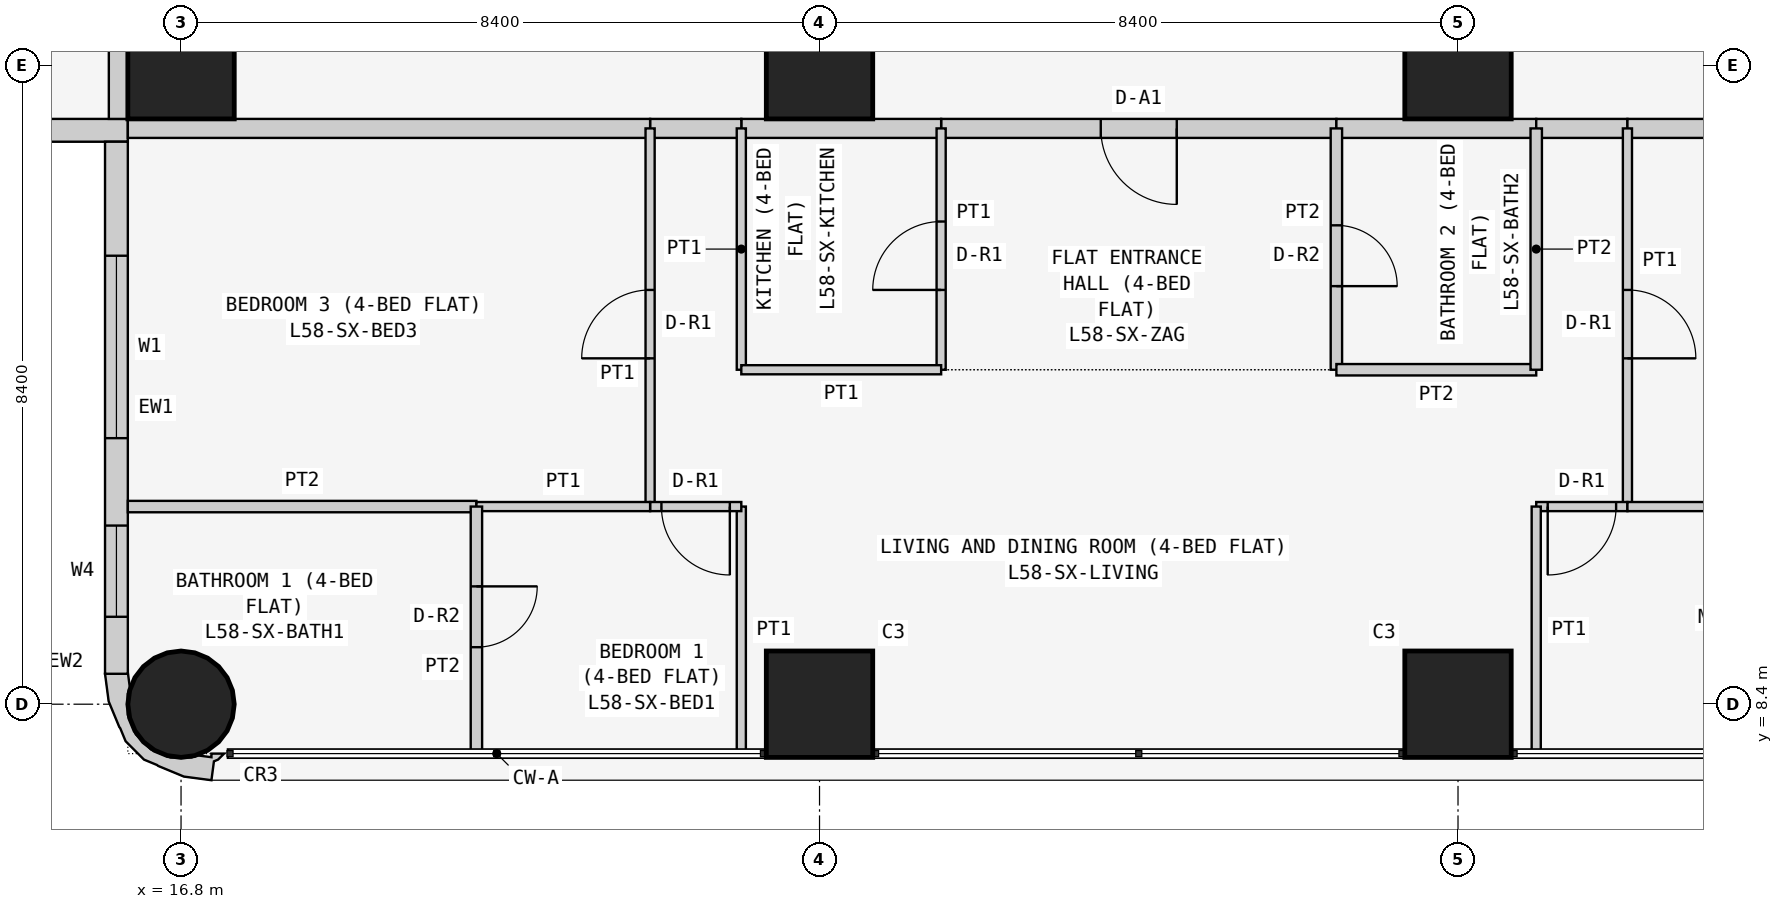
"""IFC4 building model, lengths in metres.
Left out: names, types, materials, properties, quantities, classifications, styles, units other than length and angle.
Written with IfcOpenShell. Run it as: python <this file> out.ifc"""

import sys

from ifc_helpers import new_model, si_unit, direction, frame, frame_2d, origin, origin_2d, place, context, subcontext, project, spatial, polyline, rectangle, circle, outline, extrude, element, fill, save


model = new_model("IFC4")
c1 = context("Model", 3, precision=1e-05, world=origin(), true_north=direction((0.0, 1.0)))
c2 = subcontext(c1, "Body", "Model", "MODEL_VIEW")
j1 = project(units=[si_unit("LENGTHUNIT", "METRE"), si_unit("PLANEANGLEUNIT", "RADIAN")], contexts=[c1])
p1 = place(None, origin())
s1 = spatial("IfcSite", under=j1, at=p1, CompositionType="ELEMENT")
p2 = place(p1, origin())
s2 = spatial("IfcBuilding", under=s1, at=p2, CompositionType="ELEMENT")
p3 = place(p2, frame((0.0, 0.0, 222.9)))
s3 = spatial("IfcBuildingStorey", under=s2, at=p3, CompositionType="ELEMENT", Elevation=222.9)
p4 = place(p3, frame((16.8, 8.4, 0.0), z_axis=(0.0, 0.0, 1.0), x_axis=(1.0, 0.0, 0.0)))
e1 = element("IfcColumn", 1, at=p4, inside=s3, PredefinedType="COLUMN", context=c2, shape_type="SweptSolid", body=[
    extrude(circle(Radius=0.7, at=origin_2d()), origin(), (0.0, 0.0, 1.0), 3.6),
])
for number, where, z_axis, x_axis in (
    (2, (16.8, 16.8, 0.0), (0.0, 0.0, 1.0), (1.0, 0.0, 0.0)),
    (3, (25.2, 8.4, 0.0), (0.0, 0.0, 1.0), (1.0, 0.0, 0.0)),
    (4, (25.2, 16.8, 0.0), (0.0, 0.0, 1.0), (1.0, 0.0, 0.0)),
    (5, (33.6, 8.4, 0.0), (0.0, 0.0, 1.0), (1.0, 0.0, 0.0)),
    (6, (33.6, 16.8, 0.0), (0.0, 0.0, 1.0), (1.0, 0.0, 0.0)),
):
    element("IfcColumn", number, at=place(p3, frame(where, z_axis=z_axis, x_axis=x_axis)), inside=s3, PredefinedType="COLUMN", context=c2, shape_type="SweptSolid", body=[
        extrude(rectangle(XDim=1.4, YDim=1.4, at=origin_2d()), origin(), (0.0, 0.0, 1.0), 3.6),
    ])
p5 = place(p3, frame((0.4, 15.95, 0.0), z_axis=(0.0, 0.0, 1.0), x_axis=(1.0, 0.0, 0.0)))
e7 = element("IfcWall", 7, at=p5, inside=s3, PredefinedType="SOLIDWALL", context=c2, shape_type="SweptSolid", body=[
    extrude(rectangle(XDim=15.7, YDim=0.3, at=frame_2d((7.85, 0.0))), origin(), (0.0, 0.0, 1.0), 3.45),
])
p6 = place(p5, frame((12.4, 0.0, 0.9)))
e8 = element("IfcOpeningElement", 8, at=p6, cuts=e7, PredefinedType="OPENING", context=c2, shape_type="SweptSolid", body=[
    extrude(rectangle(XDim=1.8, YDim=1.5, at=frame_2d((0.9, 0.75))), frame((0.0, 0.16, 0.0), z_axis=(0.0, -1.0, 0.0), x_axis=(1.0, 0.0, 0.0)), (0.0, 0.0, 1.0), 0.32),
])
p7 = place(p5, frame((9.55, 0.0, 1.5)))
e9 = element("IfcOpeningElement", 9, at=p7, cuts=e7, PredefinedType="OPENING", context=c2, shape_type="SweptSolid", body=[
    extrude(rectangle(XDim=0.9, YDim=0.7, at=frame_2d((0.45, 0.35))), frame((0.0, 0.16, 0.0), z_axis=(0.0, -1.0, 0.0), x_axis=(1.0, 0.0, 0.0)), (0.0, 0.0, 1.0), 0.32),
])
p8 = place(p5, frame((5.1, 0.0, 0.9)))
e10 = element("IfcOpeningElement", 10, at=p8, cuts=e7, PredefinedType="OPENING", context=c2, shape_type="SweptSolid", body=[
    extrude(rectangle(XDim=1.8, YDim=1.5, at=frame_2d((0.9, 0.75))), frame((0.0, 0.16, 0.0), z_axis=(0.0, -1.0, 0.0), x_axis=(1.0, 0.0, 0.0)), (0.0, 0.0, 1.0), 0.32),
])
p9 = place(p5, frame((2.0, 0.0, 0.0)))
e11 = element("IfcOpeningElement", 11, at=p9, cuts=e7, PredefinedType="OPENING", context=c2, shape_type="SweptSolid", body=[
    extrude(rectangle(XDim=0.9, YDim=2.4, at=frame_2d((0.45, 1.2))), frame((0.0, 0.16, 0.0), z_axis=(0.0, -1.0, 0.0), x_axis=(1.0, 0.0, 0.0)), (0.0, 0.0, 1.0), 0.32),
])
p10 = place(p5, frame((0.7, 0.0, 0.9)))
e12 = element("IfcOpeningElement", 12, at=p10, cuts=e7, PredefinedType="OPENING", context=c2, shape_type="SweptSolid", body=[
    extrude(rectangle(XDim=1.2, YDim=1.5, at=frame_2d((0.6, 0.75))), frame((0.0, 0.16, 0.0), z_axis=(0.0, -1.0, 0.0), x_axis=(1.0, 0.0, 0.0)), (0.0, 0.0, 1.0), 0.32),
])
p11 = place(p3, frame((15.95, 15.8, 0.0), z_axis=(0.0, 0.0, 1.0), x_axis=(0.0, -1.0, 0.0)))
e13 = element("IfcWall", 13, at=p11, inside=s3, PredefinedType="SOLIDWALL", context=c2, shape_type="SweptSolid", body=[
    extrude(rectangle(XDim=7.0, YDim=0.3, at=frame_2d((3.5, 0.0))), origin(), (0.0, 0.0, 1.0), 3.45),
])
p12 = place(p11, frame((1.5, 0.0, 0.9)))
e14 = element("IfcOpeningElement", 14, at=p12, cuts=e13, PredefinedType="OPENING", context=c2, shape_type="SweptSolid", body=[
    extrude(rectangle(XDim=2.4, YDim=1.5, at=frame_2d((1.2, 0.75))), frame((0.0, 0.16, 0.0), z_axis=(0.0, -1.0, 0.0), x_axis=(1.0, 0.0, 0.0)), (0.0, 0.0, 1.0), 0.32),
])
p13 = place(p11, frame((5.05, 0.0, 0.9)))
e15 = element("IfcOpeningElement", 15, at=p13, cuts=e13, PredefinedType="OPENING", context=c2, shape_type="SweptSolid", body=[
    extrude(rectangle(XDim=1.2, YDim=1.5, at=frame_2d((0.6, 0.75))), frame((0.0, 0.16, 0.0), z_axis=(0.0, -1.0, 0.0), x_axis=(1.0, 0.0, 0.0)), (0.0, 0.0, 1.0), 0.32),
])
p14 = place(p3, frame((16.076, 8.69, 0.0), z_axis=(0.0, 0.0, 1.0), x_axis=(-0.439933741929, -0.898030234854, 0.0)))
e16 = element("IfcWall", 16, at=p14, inside=s3, PredefinedType="SOLIDWALL", context=c2, shape_type="SweptSolid", body=[
    extrude(outline(polyline([(0.664, 1.577), (0.426, 1.497), (0.382, 1.536), (0.276, 1.572), (0.349, 1.423), (0.392, 1.444), (0.453, 1.261), (0.51, 1.211), (0.632, 0.961), (0.65, 0.683), (0.56, 0.419), (0.375, 0.21), (0.125, 0.087), (0.05, 0.082), (-0.127, -0.035), (-0.145, -0.044), (0.022, -0.296), (0.327, -0.094), (0.568, 0.18), (0.578, 0.199), (0.7, 0.337), (0.811, 0.661), (0.799, 0.846), (0.803, 0.866), (0.78, 1.231), (0.664, 1.577)])), origin(), (0.0, 0.0, 1.0), 3.45),
])
p15 = place(p3, frame((32.0, 15.975, 0.0), z_axis=(0.0, 0.0, 1.0), x_axis=(-1.0, 0.0, 0.0)))
e17 = element("IfcWall", 17, at=p15, inside=s3, PredefinedType="PARTITIONING", context=c2, shape_type="SweptSolid", body=[
    extrude(rectangle(XDim=5.2, YDim=0.25, at=frame_2d((2.6, 0.0))), origin(), (0.0, 0.0, 1.0), 3.45),
])
p16 = place(p15, frame((2.1, 0.0, 0.0)))
e18 = element("IfcOpeningElement", 18, at=p16, cuts=e17, PredefinedType="OPENING", context=c2, shape_type="SweptSolid", body=[
    extrude(rectangle(XDim=1.0, YDim=2.1, at=frame_2d((0.5, 1.05))), frame((0.0, 0.135, 0.0), z_axis=(0.0, -1.0, 0.0), x_axis=(1.0, 0.0, 0.0)), (0.0, 0.0, 1.0), 0.27),
])
p17 = place(p3, frame((34.629, 15.975, 0.0), z_axis=(0.0, 0.0, 1.0), x_axis=(-1.0, 0.0, 0.0)))
e19 = element("IfcWall", 19, at=p17, inside=s3, PredefinedType="PARTITIONING", context=c2, shape_type="SweptSolid", body=[
    extrude(rectangle(XDim=2.629, YDim=0.25, at=frame_2d((1.314, 0.0))), origin(), (0.0, 0.0, 1.0), 3.45),
])
p18 = place(p3, frame((26.8, 15.975, 0.0), z_axis=(0.0, 0.0, 1.0), x_axis=(-1.0, 0.0, 0.0)))
e20 = element("IfcWall", 20, at=p18, inside=s3, PredefinedType="PARTITIONING", context=c2, shape_type="SweptSolid", body=[
    extrude(rectangle(XDim=2.629, YDim=0.25, at=frame_2d((1.314, 0.0))), origin(), (0.0, 0.0, 1.0), 3.45),
])
p19 = place(p3, frame((24.171, 15.975, 0.0), z_axis=(0.0, 0.0, 1.0), x_axis=(-1.0, 0.0, 0.0)))
e21 = element("IfcWall", 21, at=p19, inside=s3, PredefinedType="PARTITIONING", context=c2, shape_type="SweptSolid", body=[
    extrude(rectangle(XDim=1.2, YDim=0.25, at=frame_2d((0.6, 0.0))), origin(), (0.0, 0.0, 1.0), 3.45),
])
p20 = place(p3, frame((35.829, 15.975, 0.0), z_axis=(0.0, 0.0, 1.0), x_axis=(-1.0, 0.0, 0.0)))
e22 = element("IfcWall", 22, at=p20, inside=s3, PredefinedType="PARTITIONING", context=c2, shape_type="SweptSolid", body=[
    extrude(rectangle(XDim=1.2, YDim=0.25, at=frame_2d((0.6, 0.0))), origin(), (0.0, 0.0, 1.0), 3.45),
])
for number, where, z_axis, x_axis in (
    (23, (42.7, 15.975, 0.0), (0.0, 0.0, 1.0), (-1.0, 0.0, 0.0)),
    (24, (22.971, 15.975, 0.0), (0.0, 0.0, 1.0), (-1.0, 0.0, 0.0)),
):
    element("IfcWall", number, at=place(p3, frame(where, z_axis=z_axis, x_axis=x_axis)), inside=s3, PredefinedType="PARTITIONING", context=c2, shape_type="SweptSolid", body=[
        extrude(rectangle(XDim=6.871, YDim=0.25, at=frame_2d((3.436, 0.0))), origin(), (0.0, 0.0, 1.0), 3.45),
    ])
p21 = place(p3, frame((15.975, 16.1, 0.0), z_axis=(0.0, 0.0, 1.0), x_axis=(0.0, 1.0, 0.0)))
e25 = element("IfcWall", 25, at=p21, inside=s3, PredefinedType="PARTITIONING", context=c2, shape_type="SweptSolid", body=[
    extrude(rectangle(XDim=6.471, YDim=0.25, at=frame_2d((3.235, 0.0))), origin(), (0.0, 0.0, 1.0), 3.45),
])
p22 = place(p3, frame((32.0, 12.8, 0.0), z_axis=(0.0, 0.0, 1.0), x_axis=(0.0, 1.0, 0.0)))
e26 = element("IfcWall", 26, at=p22, inside=s3, PredefinedType="PARTITIONING", context=c2, shape_type="SweptSolid", body=[
    extrude(rectangle(XDim=3.175, YDim=0.15, at=frame_2d((1.587, 0.0))), origin(), (0.0, 0.0, 1.0), 3.45),
])
p23 = place(p22, frame((1.1, 0.0, 0.0)))
e27 = element("IfcOpeningElement", 27, at=p23, cuts=e26, PredefinedType="OPENING", context=c2, shape_type="SweptSolid", body=[
    extrude(rectangle(XDim=0.8, YDim=2.1, at=frame_2d((0.4, 1.05))), frame((0.0, 0.085, 0.0), z_axis=(0.0, -1.0, 0.0), x_axis=(1.0, 0.0, 0.0)), (0.0, 0.0, 1.0), 0.17),
])
p24 = place(p3, frame((26.8, 15.975, 0.0), z_axis=(0.0, 0.0, 1.0), x_axis=(0.0, -1.0, 0.0)))
e28 = element("IfcWall", 28, at=p24, inside=s3, PredefinedType="PARTITIONING", context=c2, shape_type="SweptSolid", body=[
    extrude(rectangle(XDim=3.175, YDim=0.12, at=frame_2d((1.587, 0.0))), origin(), (0.0, 0.0, 1.0), 3.45),
])
p25 = place(p24, frame((1.225, 0.0, 0.0)))
e29 = element("IfcOpeningElement", 29, at=p25, cuts=e28, PredefinedType="OPENING", context=c2, shape_type="SweptSolid", body=[
    extrude(rectangle(XDim=0.9, YDim=2.1, at=frame_2d((0.45, 1.05))), frame((0.0, 0.07, 0.0), z_axis=(0.0, -1.0, 0.0), x_axis=(1.0, 0.0, 0.0)), (0.0, 0.0, 1.0), 0.14),
])
p26 = place(p3, frame((32.0, 12.8, 0.0), z_axis=(0.0, 0.0, 1.0), x_axis=(1.0, 0.0, 0.0)))
e30 = element("IfcWall", 30, at=p26, inside=s3, PredefinedType="PARTITIONING", context=c2, shape_type="SweptSolid", body=[
    extrude(rectangle(XDim=2.629, YDim=0.15, at=frame_2d((1.314, 0.0))), origin(), (0.0, 0.0, 1.0), 3.45),
])
p27 = place(p3, frame((34.629, 12.8, 0.0), z_axis=(0.0, 0.0, 1.0), x_axis=(0.0, 1.0, 0.0)))
e31 = element("IfcWall", 31, at=p27, inside=s3, PredefinedType="PARTITIONING", context=c2, shape_type="SweptSolid", body=[
    extrude(rectangle(XDim=3.175, YDim=0.15, at=frame_2d((1.587, 0.0))), origin(), (0.0, 0.0, 1.0), 3.45),
])
p28 = place(p3, frame((24.171, 15.975, 0.0), z_axis=(0.0, 0.0, 1.0), x_axis=(0.0, -1.0, 0.0)))
e32 = element("IfcWall", 32, at=p28, inside=s3, PredefinedType="PARTITIONING", context=c2, shape_type="SweptSolid", body=[
    extrude(rectangle(XDim=3.175, YDim=0.12, at=frame_2d((1.587, 0.0))), origin(), (0.0, 0.0, 1.0), 3.45),
])
p29 = place(p3, frame((24.171, 12.8, 0.0), z_axis=(0.0, 0.0, 1.0), x_axis=(1.0, 0.0, 0.0)))
e33 = element("IfcWall", 33, at=p29, inside=s3, PredefinedType="PARTITIONING", context=c2, shape_type="SweptSolid", body=[
    extrude(rectangle(XDim=2.629, YDim=0.12, at=frame_2d((1.314, 0.0))), origin(), (0.0, 0.0, 1.0), 3.45),
])
p30 = place(p3, frame((35.829, 15.975, 0.0), z_axis=(0.0, 0.0, 1.0), x_axis=(0.0, -1.0, 0.0)))
e34 = element("IfcWall", 34, at=p30, inside=s3, PredefinedType="PARTITIONING", context=c2, shape_type="SweptSolid", body=[
    extrude(rectangle(XDim=4.975, YDim=0.12, at=frame_2d((2.488, 0.0))), origin(), (0.0, 0.0, 1.0), 3.45),
])
p31 = place(p30, frame((2.125, 0.0, 0.0)))
e35 = element("IfcOpeningElement", 35, at=p31, cuts=e34, PredefinedType="OPENING", context=c2, shape_type="SweptSolid", body=[
    extrude(rectangle(XDim=0.9, YDim=2.1, at=frame_2d((0.45, 1.05))), frame((0.0, 0.07, 0.0), z_axis=(0.0, -1.0, 0.0), x_axis=(1.0, 0.0, 0.0)), (0.0, 0.0, 1.0), 0.14),
])
p32 = place(p3, frame((35.829, 11.0, 0.0), z_axis=(0.0, 0.0, 1.0), x_axis=(-1.0, 0.0, 0.0)))
e36 = element("IfcWall", 36, at=p32, inside=s3, PredefinedType="PARTITIONING", context=c2, shape_type="SweptSolid", body=[
    extrude(rectangle(XDim=1.2, YDim=0.12, at=frame_2d((0.6, 0.0))), origin(), (0.0, 0.0, 1.0), 3.45),
])
p33 = place(p32, frame((0.149, 0.0, 0.0)))
e37 = element("IfcOpeningElement", 37, at=p33, cuts=e36, PredefinedType="OPENING", context=c2, shape_type="SweptSolid", body=[
    extrude(rectangle(XDim=0.9, YDim=2.1, at=frame_2d((0.45, 1.05))), frame((0.0, 0.07, 0.0), z_axis=(0.0, -1.0, 0.0), x_axis=(1.0, 0.0, 0.0)), (0.0, 0.0, 1.0), 0.14),
])
p34 = place(p3, frame((34.629, 11.0, 0.0), z_axis=(0.0, 0.0, 1.0), x_axis=(0.0, -1.0, 0.0)))
e38 = element("IfcWall", 38, at=p34, inside=s3, PredefinedType="PARTITIONING", context=c2, shape_type="SweptSolid", body=[
    extrude(rectangle(XDim=3.25, YDim=0.12, at=frame_2d((1.625, 0.0))), origin(), (0.0, 0.0, 1.0), 3.45),
])
p35 = place(p3, frame((22.971, 11.0, 0.0), z_axis=(0.0, 0.0, 1.0), x_axis=(0.0, 1.0, 0.0)))
e39 = element("IfcWall", 39, at=p35, inside=s3, PredefinedType="PARTITIONING", context=c2, shape_type="SweptSolid", body=[
    extrude(rectangle(XDim=4.975, YDim=0.12, at=frame_2d((2.488, 0.0))), origin(), (0.0, 0.0, 1.0), 3.45),
])
p36 = place(p35, frame((1.95, 0.0, 0.0)))
e40 = element("IfcOpeningElement", 40, at=p36, cuts=e39, PredefinedType="OPENING", context=c2, shape_type="SweptSolid", body=[
    extrude(rectangle(XDim=0.9, YDim=2.1, at=frame_2d((0.45, 1.05))), frame((0.0, 0.07, 0.0), z_axis=(0.0, -1.0, 0.0), x_axis=(1.0, 0.0, 0.0)), (0.0, 0.0, 1.0), 0.14),
])
p37 = place(p3, frame((24.171, 7.75, 0.0), z_axis=(0.0, 0.0, 1.0), x_axis=(0.0, 1.0, 0.0)))
e41 = element("IfcWall", 41, at=p37, inside=s3, PredefinedType="PARTITIONING", context=c2, shape_type="SweptSolid", body=[
    extrude(rectangle(XDim=3.25, YDim=0.12, at=frame_2d((1.625, 0.0))), origin(), (0.0, 0.0, 1.0), 3.45),
])
p38 = place(p3, frame((24.171, 11.0, 0.0), z_axis=(0.0, 0.0, 1.0), x_axis=(-1.0, 0.0, 0.0)))
e42 = element("IfcWall", 42, at=p38, inside=s3, PredefinedType="PARTITIONING", context=c2, shape_type="SweptSolid", body=[
    extrude(rectangle(XDim=1.2, YDim=0.12, at=frame_2d((0.6, 0.0))), origin(), (0.0, 0.0, 1.0), 3.45),
])
p39 = place(p38, frame((0.151, 0.0, 0.0)))
e43 = element("IfcOpeningElement", 43, at=p39, cuts=e42, PredefinedType="OPENING", context=c2, shape_type="SweptSolid", body=[
    extrude(rectangle(XDim=0.9, YDim=2.1, at=frame_2d((0.45, 1.05))), frame((0.0, 0.07, 0.0), z_axis=(0.0, -1.0, 0.0), x_axis=(1.0, 0.0, 0.0)), (0.0, 0.0, 1.0), 0.14),
])
p40 = place(p3, frame((35.829, 11.0, 0.0), z_axis=(0.0, 0.0, 1.0), x_axis=(1.0, 0.0, 0.0)))
e44 = element("IfcWall", 44, at=p40, inside=s3, PredefinedType="PARTITIONING", context=c2, shape_type="SweptSolid", body=[
    extrude(rectangle(XDim=6.871, YDim=0.12, at=frame_2d((3.436, 0.0))), origin(), (0.0, 0.0, 1.0), 3.45),
])
p41 = place(p3, frame((16.1, 11.0, 0.0), z_axis=(0.0, 0.0, 1.0), x_axis=(1.0, 0.0, 0.0)))
e45 = element("IfcWall", 45, at=p41, inside=s3, PredefinedType="PARTITIONING", context=c2, shape_type="SweptSolid", body=[
    extrude(rectangle(XDim=4.586, YDim=0.15, at=frame_2d((2.293, 0.0))), origin(), (0.0, 0.0, 1.0), 3.45),
])
p42 = place(p3, frame((20.686, 11.0, 0.0), z_axis=(0.0, 0.0, 1.0), x_axis=(1.0, 0.0, 0.0)))
e46 = element("IfcWall", 46, at=p42, inside=s3, PredefinedType="PARTITIONING", context=c2, shape_type="SweptSolid", body=[
    extrude(rectangle(XDim=2.285, YDim=0.12, at=frame_2d((1.143, 0.0))), origin(), (0.0, 0.0, 1.0), 3.45),
])
p43 = place(p3, frame((20.686, 7.75, 0.0), z_axis=(0.0, 0.0, 1.0), x_axis=(0.0, 1.0, 0.0)))
e47 = element("IfcWall", 47, at=p43, inside=s3, PredefinedType="PARTITIONING", context=c2, shape_type="SweptSolid", body=[
    extrude(rectangle(XDim=3.25, YDim=0.15, at=frame_2d((1.625, 0.0))), origin(), (0.0, 0.0, 1.0), 3.45),
])
p44 = place(p43, frame((1.4, 0.0, 0.0)))
e48 = element("IfcOpeningElement", 48, at=p44, cuts=e47, PredefinedType="OPENING", context=c2, shape_type="SweptSolid", body=[
    extrude(rectangle(XDim=0.8, YDim=2.1, at=frame_2d((0.4, 1.05))), frame((0.0, 0.085, 0.0), z_axis=(0.0, -1.0, 0.0), x_axis=(1.0, 0.0, 0.0)), (0.0, 0.0, 1.0), 0.17),
])
p45 = place(p12, origin())
e49 = element("IfcWindow", 49, at=p45, inside=s3, PartitioningType="SINGLE_PANEL", PredefinedType="WINDOW", context=c2, shape_type="SweptSolid", body=[
    extrude(rectangle(XDim=2.4, YDim=1.5, at=frame_2d((1.2, 0.75))), frame((0.0, 0.03, 0.0), z_axis=(0.0, -1.0, 0.0), x_axis=(1.0, 0.0, 0.0)), (0.0, 0.0, 1.0), 0.06),
])
fill(e14, e49)
p46 = place(p13, origin())
e50 = element("IfcWindow", 50, at=p46, inside=s3, PartitioningType="SINGLE_PANEL", PredefinedType="WINDOW", context=c2, shape_type="SweptSolid", body=[
    extrude(rectangle(XDim=1.2, YDim=1.5, at=frame_2d((0.6, 0.75))), frame((0.0, 0.03, 0.0), z_axis=(0.0, -1.0, 0.0), x_axis=(1.0, 0.0, 0.0)), (0.0, 0.0, 1.0), 0.06),
])
fill(e15, e50)
p47 = place(p16, origin())
e51 = element("IfcDoor", 51, at=p47, inside=s3, OperationType="SINGLE_SWING_LEFT", PredefinedType="DOOR", context=c2, shape_type="SweptSolid", body=[
    extrude(rectangle(XDim=1.0, YDim=2.1, at=frame_2d((0.5, 1.05))), frame((0.0, 0.025, 0.0), z_axis=(0.0, -1.0, 0.0), x_axis=(1.0, 0.0, 0.0)), (0.0, 0.0, 1.0), 0.05),
])
fill(e18, e51)
p48 = place(p23, frame((0.8, 0.0, 0.0), z_axis=(0.0, 0.0, 1.0), x_axis=(-1.0, 0.0, 0.0)))
e52 = element("IfcDoor", 52, at=p48, inside=s3, OperationType="SINGLE_SWING_RIGHT", PredefinedType="DOOR", context=c2, shape_type="SweptSolid", body=[
    extrude(rectangle(XDim=0.8, YDim=2.1, at=frame_2d((0.4, 1.05))), frame((0.0, 0.025, 0.0), z_axis=(0.0, -1.0, 0.0), x_axis=(1.0, 0.0, 0.0)), (0.0, 0.0, 1.0), 0.05),
])
fill(e27, e52)
p49 = place(p25, frame((0.9, 0.0, 0.0), z_axis=(0.0, 0.0, 1.0), x_axis=(-1.0, 0.0, 0.0)))
e53 = element("IfcDoor", 53, at=p49, inside=s3, OperationType="SINGLE_SWING_LEFT", PredefinedType="DOOR", context=c2, shape_type="SweptSolid", body=[
    extrude(rectangle(XDim=0.9, YDim=2.1, at=frame_2d((0.45, 1.05))), frame((0.0, 0.025, 0.0), z_axis=(0.0, -1.0, 0.0), x_axis=(1.0, 0.0, 0.0)), (0.0, 0.0, 1.0), 0.05),
])
fill(e29, e53)
p50 = place(p31, origin())
e54 = element("IfcDoor", 54, at=p50, inside=s3, OperationType="SINGLE_SWING_RIGHT", PredefinedType="DOOR", context=c2, shape_type="SweptSolid", body=[
    extrude(rectangle(XDim=0.9, YDim=2.1, at=frame_2d((0.45, 1.05))), frame((0.0, 0.025, 0.0), z_axis=(0.0, -1.0, 0.0), x_axis=(1.0, 0.0, 0.0)), (0.0, 0.0, 1.0), 0.05),
])
fill(e35, e54)
p51 = place(p33, origin())
e55 = element("IfcDoor", 55, at=p51, inside=s3, OperationType="SINGLE_SWING_RIGHT", PredefinedType="DOOR", context=c2, shape_type="SweptSolid", body=[
    extrude(rectangle(XDim=0.9, YDim=2.1, at=frame_2d((0.45, 1.05))), frame((0.0, 0.025, 0.0), z_axis=(0.0, -1.0, 0.0), x_axis=(1.0, 0.0, 0.0)), (0.0, 0.0, 1.0), 0.05),
])
fill(e37, e55)
p52 = place(p36, origin())
e56 = element("IfcDoor", 56, at=p52, inside=s3, OperationType="SINGLE_SWING_LEFT", PredefinedType="DOOR", context=c2, shape_type="SweptSolid", body=[
    extrude(rectangle(XDim=0.9, YDim=2.1, at=frame_2d((0.45, 1.05))), frame((0.0, 0.025, 0.0), z_axis=(0.0, -1.0, 0.0), x_axis=(1.0, 0.0, 0.0)), (0.0, 0.0, 1.0), 0.05),
])
fill(e40, e56)
p53 = place(p39, origin())
e57 = element("IfcDoor", 57, at=p53, inside=s3, OperationType="SINGLE_SWING_LEFT", PredefinedType="DOOR", context=c2, shape_type="SweptSolid", body=[
    extrude(rectangle(XDim=0.9, YDim=2.1, at=frame_2d((0.45, 1.05))), frame((0.0, 0.025, 0.0), z_axis=(0.0, -1.0, 0.0), x_axis=(1.0, 0.0, 0.0)), (0.0, 0.0, 1.0), 0.05),
])
fill(e43, e57)
p54 = place(p44, frame((0.8, 0.0, 0.0), z_axis=(0.0, 0.0, 1.0), x_axis=(-1.0, 0.0, 0.0)))
e58 = element("IfcDoor", 58, at=p54, inside=s3, OperationType="SINGLE_SWING_LEFT", PredefinedType="DOOR", context=c2, shape_type="SweptSolid", body=[
    extrude(rectangle(XDim=0.8, YDim=2.1, at=frame_2d((0.4, 1.05))), frame((0.0, 0.025, 0.0), z_axis=(0.0, -1.0, 0.0), x_axis=(1.0, 0.0, 0.0)), (0.0, 0.0, 1.0), 0.05),
])
fill(e48, e58)
save(model, sys.argv[1])
